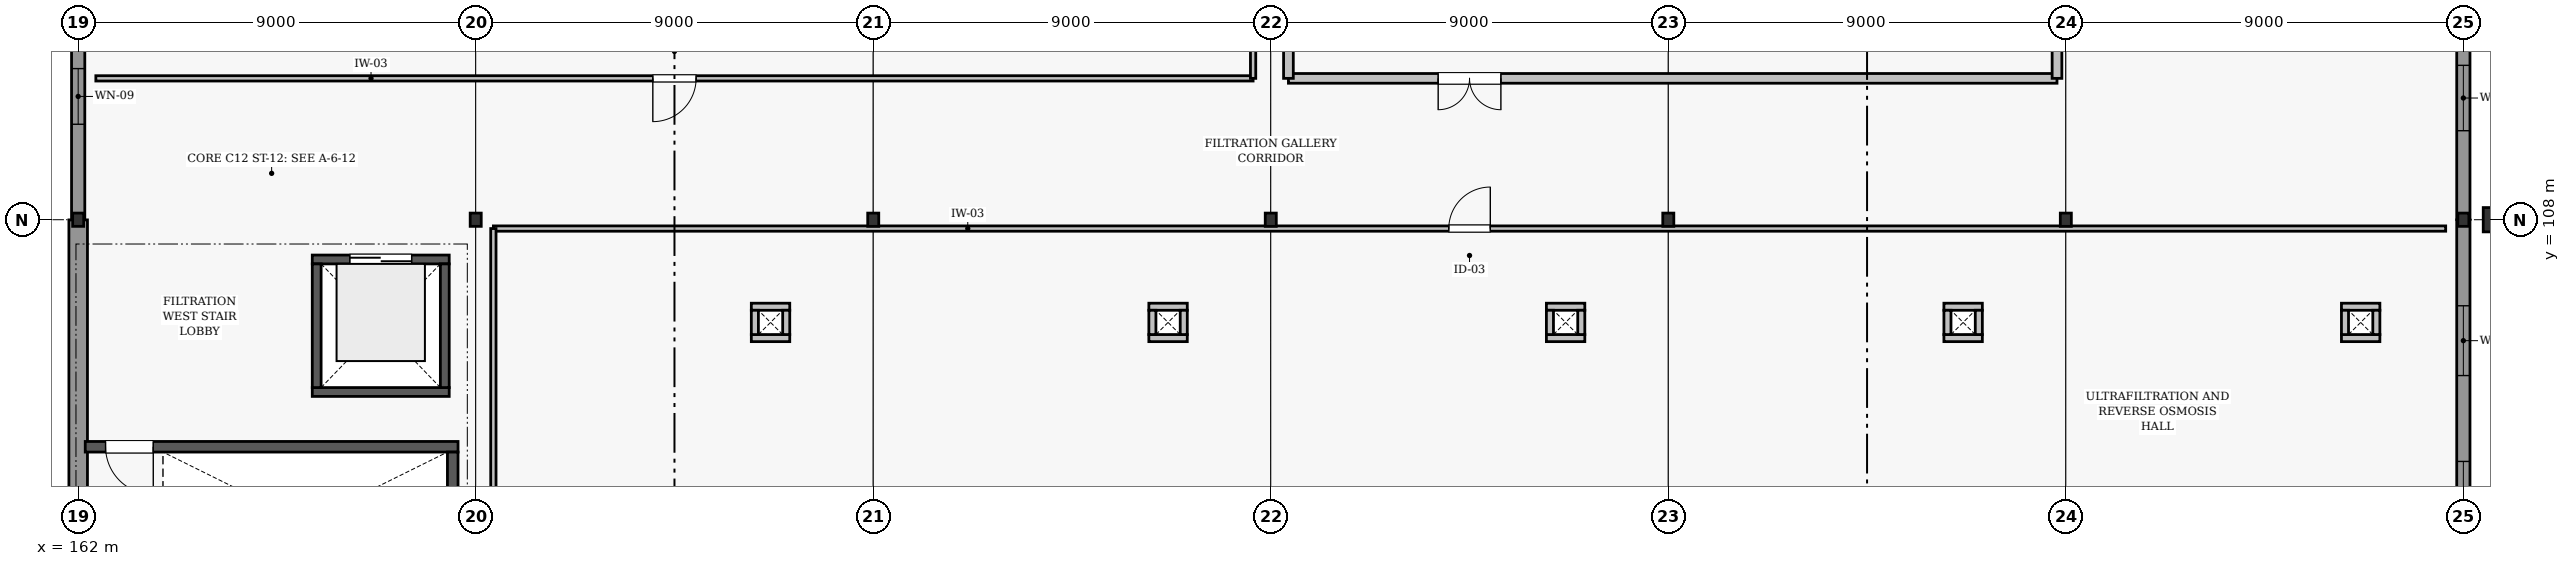
"""IFC4 building model, lengths in metres.
Left out: names, types, materials, properties, quantities, classifications, styles, units other than length and angle.
Written with IfcOpenShell. Run it as: python <this file> out.ifc"""

import sys

from ifc_helpers import new_model, si_unit, direction, frame, frame_2d, origin, origin_2d, place, context, subcontext, project, spatial, rectangle, i_section, extrude, element, fill, save


model = new_model("IFC4")
c1 = context("Model", 3, precision=1e-05, world=origin(), true_north=direction((0.0, 1.0)))
c2 = subcontext(c1, "Body", "Model", "MODEL_VIEW")
j1 = project(units=[si_unit("LENGTHUNIT", "METRE"), si_unit("PLANEANGLEUNIT", "RADIAN")], contexts=[c1])
p1 = place(None, origin())
s1 = spatial("IfcSite", under=j1, at=p1, CompositionType="ELEMENT")
p2 = place(p1, origin())
s2 = spatial("IfcBuilding", under=s1, at=p2, CompositionType="ELEMENT")
p3 = place(p2, frame((0.0, 0.0, 4.8)))
s3 = spatial("IfcBuildingStorey", under=s2, at=p3, CompositionType="ELEMENT", Elevation=4.8)
for number, where, z_axis, x_axis in (
    (1, (162.0, 108.0, 0.0), (0.0, 0.0, 1.0), (1.0, 0.0, 0.0)),
    (2, (171.0, 108.0, 0.0), (0.0, 0.0, 1.0), (1.0, 0.0, 0.0)),
    (3, (180.0, 108.0, 0.0), (0.0, 0.0, 1.0), (1.0, 0.0, 0.0)),
    (4, (189.0, 108.0, 0.0), (0.0, 0.0, 1.0), (1.0, 0.0, 0.0)),
    (5, (198.0, 108.0, 0.0), (0.0, 0.0, 1.0), (1.0, 0.0, 0.0)),
    (6, (207.0, 108.0, 0.0), (0.0, 0.0, 1.0), (1.0, 0.0, 0.0)),
    (7, (216.0, 108.0, 0.0), (0.0, 0.0, 1.0), (1.0, 0.0, 0.0)),
):
    element("IfcColumn", number, at=place(p3, frame(where, z_axis=z_axis, x_axis=x_axis)), inside=s3, PredefinedType="COLUMN", context=c2, shape_type="SweptSolid", body=[
        extrude(i_section(OverallWidth=0.25, OverallDepth=0.3, WebThickness=0.01, FlangeThickness=0.01, FilletRadius=0.012, at=origin_2d()), origin(), (0.0, 0.0, 1.0), 3.6),
    ])
p4 = place(p3, frame((216.85, 108.0, 0.0), z_axis=(0.0, 0.0, 1.0), x_axis=(0.0, 1.0, 0.0)))
e8 = element("IfcColumn", 8, at=p4, inside=s3, PredefinedType="PILASTER", context=c2, shape_type="SweptSolid", body=[
    extrude(rectangle(XDim=0.55, YDim=0.8, at=origin_2d()), origin(), (0.0, 0.0, 1.0), 3.6),
])
p5 = place(p3, frame((162.0, 99.004, 0.0), z_axis=(0.0, 0.0, 1.0), x_axis=(0.0, 1.0, 0.0)))
e9 = element("IfcWall", 9, at=p5, inside=s3, PredefinedType="SOLIDWALL", context=c2, shape_type="SweptSolid", body=[
    extrude(rectangle(XDim=8.992, YDim=0.42, at=frame_2d((4.496, 0.0))), origin(), (0.0, 0.0, 1.0), 2.842),
])
p6 = place(p3, frame((162.0, 108.004, 0.0), z_axis=(0.0, 0.0, 1.0), x_axis=(0.0, 1.0, 0.0)))
e10 = element("IfcWall", 10, at=p6, inside=s3, PredefinedType="SOLIDWALL", context=c2, shape_type="SweptSolid", body=[
    extrude(rectangle(XDim=8.992, YDim=0.3, at=frame_2d((4.496, 0.0))), origin(), (0.0, 0.0, 1.0), 2.842),
])
p7 = place(p6, frame((2.157, 0.0, 0.85)))
e11 = element("IfcOpeningElement", 11, at=p7, cuts=e10, PredefinedType="OPENING", context=c2, shape_type="SweptSolid", body=[
    extrude(rectangle(XDim=1.26, YDim=1.46, at=frame_2d((0.63, 0.73))), frame((0.0, 0.16, 0.0), z_axis=(0.0, -1.0, 0.0), x_axis=(1.0, 0.0, 0.0)), (0.0, 0.0, 1.0), 0.32),
])
p8 = place(p6, frame((5.575, 0.0, 0.85)))
e12 = element("IfcOpeningElement", 12, at=p8, cuts=e10, PredefinedType="OPENING", context=c2, shape_type="SweptSolid", body=[
    extrude(rectangle(XDim=1.26, YDim=1.46, at=frame_2d((0.63, 0.73))), frame((0.0, 0.16, 0.0), z_axis=(0.0, -1.0, 0.0), x_axis=(1.0, 0.0, 0.0)), (0.0, 0.0, 1.0), 0.32),
])
p9 = place(p3, frame((216.0, 99.004, 0.0), z_axis=(0.0, 0.0, 1.0), x_axis=(0.0, 1.0, 0.0)))
e13 = element("IfcWall", 13, at=p9, inside=s3, PredefinedType="SOLIDWALL", context=c2, shape_type="SweptSolid", body=[
    extrude(rectangle(XDim=8.992, YDim=0.3, at=frame_2d((4.496, 0.0))), origin(), (0.0, 0.0, 1.0), 2.842),
])
p10 = place(p9, frame((1.944, 0.0, 0.85)))
e14 = element("IfcOpeningElement", 14, at=p10, cuts=e13, PredefinedType="OPENING", context=c2, shape_type="SweptSolid", body=[
    extrude(rectangle(XDim=1.58, YDim=1.6, at=frame_2d((0.79, 0.8))), frame((0.0, 0.16, 0.0), z_axis=(0.0, -1.0, 0.0), x_axis=(1.0, 0.0, 0.0)), (0.0, 0.0, 1.0), 0.32),
])
p11 = place(p9, frame((5.468, 0.0, 0.85)))
e15 = element("IfcOpeningElement", 15, at=p11, cuts=e13, PredefinedType="OPENING", context=c2, shape_type="SweptSolid", body=[
    extrude(rectangle(XDim=1.58, YDim=1.6, at=frame_2d((0.79, 0.8))), frame((0.0, 0.16, 0.0), z_axis=(0.0, -1.0, 0.0), x_axis=(1.0, 0.0, 0.0)), (0.0, 0.0, 1.0), 0.32),
])
p12 = place(p3, frame((216.0, 108.004, 0.0), z_axis=(0.0, 0.0, 1.0), x_axis=(0.0, 1.0, 0.0)))
e16 = element("IfcWall", 16, at=p12, inside=s3, PredefinedType="SOLIDWALL", context=c2, shape_type="SweptSolid", body=[
    extrude(rectangle(XDim=8.992, YDim=0.3, at=frame_2d((4.496, 0.0))), origin(), (0.0, 0.0, 1.0), 2.842),
])
p13 = place(p12, frame((2.011, 0.0, 0.85)))
e17 = element("IfcOpeningElement", 17, at=p13, cuts=e16, PredefinedType="OPENING", context=c2, shape_type="SweptSolid", body=[
    extrude(rectangle(XDim=1.48, YDim=1.56, at=frame_2d((0.74, 0.78))), frame((0.0, 0.16, 0.0), z_axis=(0.0, -1.0, 0.0), x_axis=(1.0, 0.0, 0.0)), (0.0, 0.0, 1.0), 0.32),
])
p14 = place(p12, frame((5.501, 0.0, 0.85)))
e18 = element("IfcOpeningElement", 18, at=p14, cuts=e16, PredefinedType="OPENING", context=c2, shape_type="SweptSolid", body=[
    extrude(rectangle(XDim=1.48, YDim=1.56, at=frame_2d((0.74, 0.78))), frame((0.0, 0.16, 0.0), z_axis=(0.0, -1.0, 0.0), x_axis=(1.0, 0.0, 0.0)), (0.0, 0.0, 1.0), 0.32),
])
p15 = place(p3, frame((162.16, 102.86, 0.0), z_axis=(0.0, 0.0, 1.0), x_axis=(1.0, 0.0, 0.0)))
e19 = element("IfcWall", 19, at=p15, inside=s3, PredefinedType="SHEAR", context=c2, shape_type="SweptSolid", body=[
    extrude(rectangle(XDim=8.44, YDim=0.24, at=frame_2d((4.22, 0.0))), origin(), (0.0, 0.0, 1.0), 3.35),
])
p16 = place(p15, frame((0.46, 0.0, 0.0)))
e20 = element("IfcOpeningElement", 20, at=p16, cuts=e19, PredefinedType="OPENING", context=c2, shape_type="SweptSolid", body=[
    extrude(rectangle(XDim=1.08, YDim=2.08, at=frame_2d((0.54, 1.04))), frame((0.0, 0.13, 0.0), z_axis=(0.0, -1.0, 0.0), x_axis=(1.0, 0.0, 0.0)), (0.0, 0.0, 1.0), 0.26),
])
p17 = place(p3, frame((170.48, 99.55, 0.0), z_axis=(0.0, 0.0, 1.0), x_axis=(0.0, 1.0, 0.0)))
e21 = element("IfcWall", 21, at=p17, inside=s3, PredefinedType="SHEAR", context=c2, shape_type="SweptSolid", body=[
    extrude(rectangle(XDim=3.19, YDim=0.24, at=frame_2d((1.595, 0.0))), origin(), (0.0, 0.0, 1.0), 3.35),
])
p18 = place(p3, frame((167.3, 104.1, 0.0), z_axis=(0.0, 0.0, 1.0), x_axis=(1.0, 0.0, 0.0)))
e22 = element("IfcWall", 22, at=p18, inside=s3, PredefinedType="SHEAR", context=c2, shape_type="SweptSolid", body=[
    extrude(rectangle(XDim=3.1, YDim=0.2, at=frame_2d((1.55, 0.0))), origin(), (0.0, 0.0, 1.0), 3.35),
])
p19 = place(p3, frame((167.3, 107.1, 0.0), z_axis=(0.0, 0.0, 1.0), x_axis=(1.0, 0.0, 0.0)))
e23 = element("IfcWall", 23, at=p19, inside=s3, PredefinedType="SHEAR", context=c2, shape_type="SweptSolid", body=[
    extrude(rectangle(XDim=3.1, YDim=0.2, at=frame_2d((1.55, 0.0))), origin(), (0.0, 0.0, 1.0), 3.35),
])
p20 = place(p19, frame((0.85, 0.0, 0.0)))
e24 = element("IfcOpeningElement", 24, at=p20, cuts=e23, PredefinedType="OPENING", context=c2, shape_type="SweptSolid", body=[
    extrude(rectangle(XDim=1.4, YDim=2.15, at=frame_2d((0.7, 1.075))), frame((0.0, 0.11, 0.0), z_axis=(0.0, -1.0, 0.0), x_axis=(1.0, 0.0, 0.0)), (0.0, 0.0, 1.0), 0.22),
])
for number, where, z_axis, x_axis in (
    (25, (167.4, 104.2, 0.0), (0.0, 0.0, 1.0), (0.0, 1.0, 0.0)),
    (26, (170.3, 104.2, 0.0), (0.0, 0.0, 1.0), (0.0, 1.0, 0.0)),
):
    element("IfcWall", number, at=place(p3, frame(where, z_axis=z_axis, x_axis=x_axis)), inside=s3, PredefinedType="SHEAR", context=c2, shape_type="SweptSolid", body=[
        extrude(rectangle(XDim=2.8, YDim=0.2, at=frame_2d((1.4, 0.0))), origin(), (0.0, 0.0, 1.0), 3.35),
    ])
for number, where, z_axis, x_axis in (
    (27, (177.24, 105.32, 0.0), (0.0, 0.0, 1.0), (1.0, 0.0, 0.0)),
    (28, (177.24, 106.03, 0.0), (0.0, 0.0, 1.0), (1.0, 0.0, 0.0)),
):
    element("IfcWall", number, at=place(p3, frame(where, z_axis=z_axis, x_axis=x_axis)), inside=s3, PredefinedType="PARTITIONING", context=c2, shape_type="SweptSolid", body=[
        extrude(rectangle(XDim=0.87, YDim=0.16, at=frame_2d((0.435, 0.0))), origin(), (0.0, 0.0, 1.0), 3.35),
    ])
for number, where, z_axis, x_axis in (
    (29, (177.32, 105.4, 0.0), (0.0, 0.0, 1.0), (0.0, 1.0, 0.0)),
    (30, (178.03, 105.4, 0.0), (0.0, 0.0, 1.0), (0.0, 1.0, 0.0)),
):
    element("IfcWall", number, at=place(p3, frame(where, z_axis=z_axis, x_axis=x_axis)), inside=s3, PredefinedType="PARTITIONING", context=c2, shape_type="SweptSolid", body=[
        extrude(rectangle(XDim=0.55, YDim=0.16, at=frame_2d((0.275, 0.0))), origin(), (0.0, 0.0, 1.0), 3.35),
    ])
for number, where, z_axis, x_axis in (
    (31, (186.24, 105.32, 0.0), (0.0, 0.0, 1.0), (1.0, 0.0, 0.0)),
    (32, (186.24, 106.03, 0.0), (0.0, 0.0, 1.0), (1.0, 0.0, 0.0)),
):
    element("IfcWall", number, at=place(p3, frame(where, z_axis=z_axis, x_axis=x_axis)), inside=s3, PredefinedType="PARTITIONING", context=c2, shape_type="SweptSolid", body=[
        extrude(rectangle(XDim=0.87, YDim=0.16, at=frame_2d((0.435, 0.0))), origin(), (0.0, 0.0, 1.0), 3.35),
    ])
for number, where, z_axis, x_axis in (
    (33, (186.32, 105.4, 0.0), (0.0, 0.0, 1.0), (0.0, 1.0, 0.0)),
    (34, (187.03, 105.4, 0.0), (0.0, 0.0, 1.0), (0.0, 1.0, 0.0)),
):
    element("IfcWall", number, at=place(p3, frame(where, z_axis=z_axis, x_axis=x_axis)), inside=s3, PredefinedType="PARTITIONING", context=c2, shape_type="SweptSolid", body=[
        extrude(rectangle(XDim=0.55, YDim=0.16, at=frame_2d((0.275, 0.0))), origin(), (0.0, 0.0, 1.0), 3.35),
    ])
for number, where, z_axis, x_axis in (
    (35, (195.24, 105.32, 0.0), (0.0, 0.0, 1.0), (1.0, 0.0, 0.0)),
    (36, (195.24, 106.03, 0.0), (0.0, 0.0, 1.0), (1.0, 0.0, 0.0)),
):
    element("IfcWall", number, at=place(p3, frame(where, z_axis=z_axis, x_axis=x_axis)), inside=s3, PredefinedType="PARTITIONING", context=c2, shape_type="SweptSolid", body=[
        extrude(rectangle(XDim=0.87, YDim=0.16, at=frame_2d((0.435, 0.0))), origin(), (0.0, 0.0, 1.0), 3.35),
    ])
for number, where, z_axis, x_axis in (
    (37, (195.32, 105.4, 0.0), (0.0, 0.0, 1.0), (0.0, 1.0, 0.0)),
    (38, (196.03, 105.4, 0.0), (0.0, 0.0, 1.0), (0.0, 1.0, 0.0)),
):
    element("IfcWall", number, at=place(p3, frame(where, z_axis=z_axis, x_axis=x_axis)), inside=s3, PredefinedType="PARTITIONING", context=c2, shape_type="SweptSolid", body=[
        extrude(rectangle(XDim=0.55, YDim=0.16, at=frame_2d((0.275, 0.0))), origin(), (0.0, 0.0, 1.0), 3.35),
    ])
for number, where, z_axis, x_axis in (
    (39, (204.24, 105.32, 0.0), (0.0, 0.0, 1.0), (1.0, 0.0, 0.0)),
    (40, (204.24, 106.03, 0.0), (0.0, 0.0, 1.0), (1.0, 0.0, 0.0)),
):
    element("IfcWall", number, at=place(p3, frame(where, z_axis=z_axis, x_axis=x_axis)), inside=s3, PredefinedType="PARTITIONING", context=c2, shape_type="SweptSolid", body=[
        extrude(rectangle(XDim=0.87, YDim=0.16, at=frame_2d((0.435, 0.0))), origin(), (0.0, 0.0, 1.0), 3.35),
    ])
for number, where, z_axis, x_axis in (
    (41, (204.32, 105.4, 0.0), (0.0, 0.0, 1.0), (0.0, 1.0, 0.0)),
    (42, (205.03, 105.4, 0.0), (0.0, 0.0, 1.0), (0.0, 1.0, 0.0)),
):
    element("IfcWall", number, at=place(p3, frame(where, z_axis=z_axis, x_axis=x_axis)), inside=s3, PredefinedType="PARTITIONING", context=c2, shape_type="SweptSolid", body=[
        extrude(rectangle(XDim=0.55, YDim=0.16, at=frame_2d((0.275, 0.0))), origin(), (0.0, 0.0, 1.0), 3.35),
    ])
for number, where, z_axis, x_axis in (
    (43, (213.24, 105.32, 0.0), (0.0, 0.0, 1.0), (1.0, 0.0, 0.0)),
    (44, (213.24, 106.03, 0.0), (0.0, 0.0, 1.0), (1.0, 0.0, 0.0)),
):
    element("IfcWall", number, at=place(p3, frame(where, z_axis=z_axis, x_axis=x_axis)), inside=s3, PredefinedType="PARTITIONING", context=c2, shape_type="SweptSolid", body=[
        extrude(rectangle(XDim=0.87, YDim=0.16, at=frame_2d((0.435, 0.0))), origin(), (0.0, 0.0, 1.0), 3.35),
    ])
for number, where, z_axis, x_axis in (
    (45, (213.32, 105.4, 0.0), (0.0, 0.0, 1.0), (0.0, 1.0, 0.0)),
    (46, (214.03, 105.4, 0.0), (0.0, 0.0, 1.0), (0.0, 1.0, 0.0)),
):
    element("IfcWall", number, at=place(p3, frame(where, z_axis=z_axis, x_axis=x_axis)), inside=s3, PredefinedType="PARTITIONING", context=c2, shape_type="SweptSolid", body=[
        extrude(rectangle(XDim=0.55, YDim=0.16, at=frame_2d((0.275, 0.0))), origin(), (0.0, 0.0, 1.0), 3.35),
    ])
p21 = place(p3, frame((171.4, 107.8, 0.0), z_axis=(0.0, 0.0, 1.0), x_axis=(1.0, 0.0, 0.0)))
e47 = element("IfcWall", 47, at=p21, inside=s3, PredefinedType="PARTITIONING", context=c2, shape_type="SweptSolid", body=[
    extrude(rectangle(XDim=44.2, YDim=0.12, at=frame_2d((22.1, 0.0))), origin(), (0.0, 0.0, 1.0), 2.845),
])
p22 = place(p21, frame((21.63, 0.0, 0.0)))
e48 = element("IfcOpeningElement", 48, at=p22, cuts=e47, PredefinedType="OPENING", context=c2, shape_type="SweptSolid", body=[
    extrude(rectangle(XDim=0.94, YDim=2.06, at=frame_2d((0.47, 1.03))), frame((0.0, 0.07, 0.0), z_axis=(0.0, -1.0, 0.0), x_axis=(1.0, 0.0, 0.0)), (0.0, 0.0, 1.0), 0.14),
])
p23 = place(p3, frame((171.4, 99.4, 0.0), z_axis=(0.0, 0.0, 1.0), x_axis=(0.0, 1.0, 0.0)))
e49 = element("IfcWall", 49, at=p23, inside=s3, PredefinedType="PARTITIONING", context=c2, shape_type="SweptSolid", body=[
    extrude(rectangle(XDim=8.4, YDim=0.12, at=frame_2d((4.2, 0.0))), origin(), (0.0, 0.0, 1.0), 3.35),
])
p24 = place(p3, frame((162.4, 111.2, 0.0), z_axis=(0.0, 0.0, 1.0), x_axis=(1.0, 0.0, 0.0)))
e50 = element("IfcWall", 50, at=p24, inside=s3, PredefinedType="PARTITIONING", context=c2, shape_type="SweptSolid", body=[
    extrude(rectangle(XDim=26.2, YDim=0.12, at=frame_2d((13.1, 0.0))), origin(), (0.0, 0.0, 1.0), 2.845),
])
p25 = place(p24, frame((12.61, 0.0, 0.0)))
e51 = element("IfcOpeningElement", 51, at=p25, cuts=e50, PredefinedType="OPENING", context=c2, shape_type="SweptSolid", body=[
    extrude(rectangle(XDim=0.98, YDim=2.08, at=frame_2d((0.49, 1.04))), frame((0.0, 0.07, 0.0), z_axis=(0.0, -1.0, 0.0), x_axis=(1.0, 0.0, 0.0)), (0.0, 0.0, 1.0), 0.14),
])
p26 = place(p3, frame((188.6, 111.2, 0.0), z_axis=(0.0, 0.0, 1.0), x_axis=(0.0, 1.0, 0.0)))
e52 = element("IfcWall", 52, at=p26, inside=s3, PredefinedType="PARTITIONING", context=c2, shape_type="SweptSolid", body=[
    extrude(rectangle(XDim=23.4, YDim=0.12, at=frame_2d((11.7, 0.0))), origin(), (0.0, 0.0, 1.0), 2.845),
])
p27 = place(p3, frame((189.4, 111.2, 0.0), z_axis=(0.0, 0.0, 1.0), x_axis=(1.0, 0.0, 0.0)))
e53 = element("IfcWall", 53, at=p27, inside=s3, PredefinedType="SOLIDWALL", context=c2, shape_type="SweptSolid", body=[
    extrude(rectangle(XDim=17.4, YDim=0.22, at=frame_2d((8.7, 0.0))), origin(), (0.0, 0.0, 1.0), 2.845),
])
p28 = place(p27, frame((3.39, 0.0, 0.0)))
e54 = element("IfcOpeningElement", 54, at=p28, cuts=e53, PredefinedType="OPENING", context=c2, shape_type="SweptSolid", body=[
    extrude(rectangle(XDim=1.42, YDim=2.12, at=frame_2d((0.71, 1.06))), frame((0.0, 0.12, 0.0), z_axis=(0.0, -1.0, 0.0), x_axis=(1.0, 0.0, 0.0)), (0.0, 0.0, 1.0), 0.24),
])
for number, where, z_axis, x_axis in (
    (55, (189.4, 111.2, 0.0), (0.0, 0.0, 1.0), (0.0, 1.0, 0.0)),
    (56, (206.8, 111.2, 0.0), (0.0, 0.0, 1.0), (0.0, 1.0, 0.0)),
):
    element("IfcWall", number, at=place(p3, frame(where, z_axis=z_axis, x_axis=x_axis)), inside=s3, PredefinedType="SOLIDWALL", context=c2, shape_type="SweptSolid", body=[
        extrude(rectangle(XDim=23.4, YDim=0.22, at=frame_2d((11.7, 0.0))), origin(), (0.0, 0.0, 1.0), 2.845),
    ])
p29 = place(p7, origin())
e57 = element("IfcWindow", 57, at=p29, inside=s3, PartitioningType="SINGLE_PANEL", PredefinedType="WINDOW", context=c2, shape_type="SweptSolid", body=[
    extrude(rectangle(XDim=1.26, YDim=1.46, at=frame_2d((0.63, 0.73))), frame((0.0, 0.03, 0.0), z_axis=(0.0, -1.0, 0.0), x_axis=(1.0, 0.0, 0.0)), (0.0, 0.0, 1.0), 0.06),
])
fill(e11, e57)
p30 = place(p10, origin())
e58 = element("IfcWindow", 58, at=p30, inside=s3, PartitioningType="SINGLE_PANEL", PredefinedType="WINDOW", context=c2, shape_type="SweptSolid", body=[
    extrude(rectangle(XDim=1.58, YDim=1.6, at=frame_2d((0.79, 0.8))), frame((0.0, 0.03, 0.0), z_axis=(0.0, -1.0, 0.0), x_axis=(1.0, 0.0, 0.0)), (0.0, 0.0, 1.0), 0.06),
])
fill(e14, e58)
p31 = place(p11, origin())
e59 = element("IfcWindow", 59, at=p31, inside=s3, PartitioningType="SINGLE_PANEL", PredefinedType="WINDOW", context=c2, shape_type="SweptSolid", body=[
    extrude(rectangle(XDim=1.58, YDim=1.6, at=frame_2d((0.79, 0.8))), frame((0.0, 0.03, 0.0), z_axis=(0.0, -1.0, 0.0), x_axis=(1.0, 0.0, 0.0)), (0.0, 0.0, 1.0), 0.06),
])
fill(e15, e59)
p32 = place(p13, origin())
e60 = element("IfcWindow", 60, at=p32, inside=s3, PartitioningType="SINGLE_PANEL", PredefinedType="WINDOW", context=c2, shape_type="SweptSolid", body=[
    extrude(rectangle(XDim=1.48, YDim=1.56, at=frame_2d((0.74, 0.78))), frame((0.0, 0.03, 0.0), z_axis=(0.0, -1.0, 0.0), x_axis=(1.0, 0.0, 0.0)), (0.0, 0.0, 1.0), 0.06),
])
fill(e17, e60)
p33 = place(p16, frame((1.08, 0.0, 0.0), z_axis=(0.0, 0.0, 1.0), x_axis=(-1.0, 0.0, 0.0)))
e61 = element("IfcDoor", 61, at=p33, inside=s3, OperationType="SINGLE_SWING_RIGHT", PredefinedType="DOOR", context=c2, shape_type="SweptSolid", body=[
    extrude(rectangle(XDim=1.08, YDim=2.08, at=frame_2d((0.54, 1.04))), frame((0.0, 0.025, 0.0), z_axis=(0.0, -1.0, 0.0), x_axis=(1.0, 0.0, 0.0)), (0.0, 0.0, 1.0), 0.05),
])
fill(e20, e61)
p34 = place(p20, origin())
e62 = element("IfcDoor", 62, at=p34, inside=s3, OperationType="DOUBLE_DOOR_SLIDING", PredefinedType="DOOR", context=c2, shape_type="SweptSolid", body=[
    extrude(rectangle(XDim=1.4, YDim=2.15, at=frame_2d((0.7, 1.075))), frame((0.0, 0.025, 0.0), z_axis=(0.0, -1.0, 0.0), x_axis=(1.0, 0.0, 0.0)), (0.0, 0.0, 1.0), 0.05),
])
fill(e24, e62)
p35 = place(p22, origin())
e63 = element("IfcDoor", 63, at=p35, inside=s3, OperationType="SINGLE_SWING_RIGHT", PredefinedType="DOOR", context=c2, shape_type="SweptSolid", body=[
    extrude(rectangle(XDim=0.94, YDim=2.06, at=frame_2d((0.47, 1.03))), frame((0.0, 0.025, 0.0), z_axis=(0.0, -1.0, 0.0), x_axis=(1.0, 0.0, 0.0)), (0.0, 0.0, 1.0), 0.05),
])
fill(e48, e63)
p36 = place(p25, frame((0.98, 0.0, 0.0), z_axis=(0.0, 0.0, 1.0), x_axis=(-1.0, 0.0, 0.0)))
e64 = element("IfcDoor", 64, at=p36, inside=s3, OperationType="SINGLE_SWING_LEFT", PredefinedType="DOOR", context=c2, shape_type="SweptSolid", body=[
    extrude(rectangle(XDim=0.98, YDim=2.08, at=frame_2d((0.49, 1.04))), frame((0.0, 0.025, 0.0), z_axis=(0.0, -1.0, 0.0), x_axis=(1.0, 0.0, 0.0)), (0.0, 0.0, 1.0), 0.05),
])
fill(e51, e64)
p37 = place(p28, frame((1.42, 0.0, 0.0), z_axis=(0.0, 0.0, 1.0), x_axis=(-1.0, 0.0, 0.0)))
e65 = element("IfcDoor", 65, at=p37, inside=s3, OperationType="DOUBLE_SWING_LEFT", PredefinedType="DOOR", context=c2, shape_type="SweptSolid", body=[
    extrude(rectangle(XDim=1.42, YDim=2.12, at=frame_2d((0.71, 1.06))), frame((0.0, 0.025, 0.0), z_axis=(0.0, -1.0, 0.0), x_axis=(1.0, 0.0, 0.0)), (0.0, 0.0, 1.0), 0.05),
])
fill(e54, e65)
save(model, sys.argv[1])
